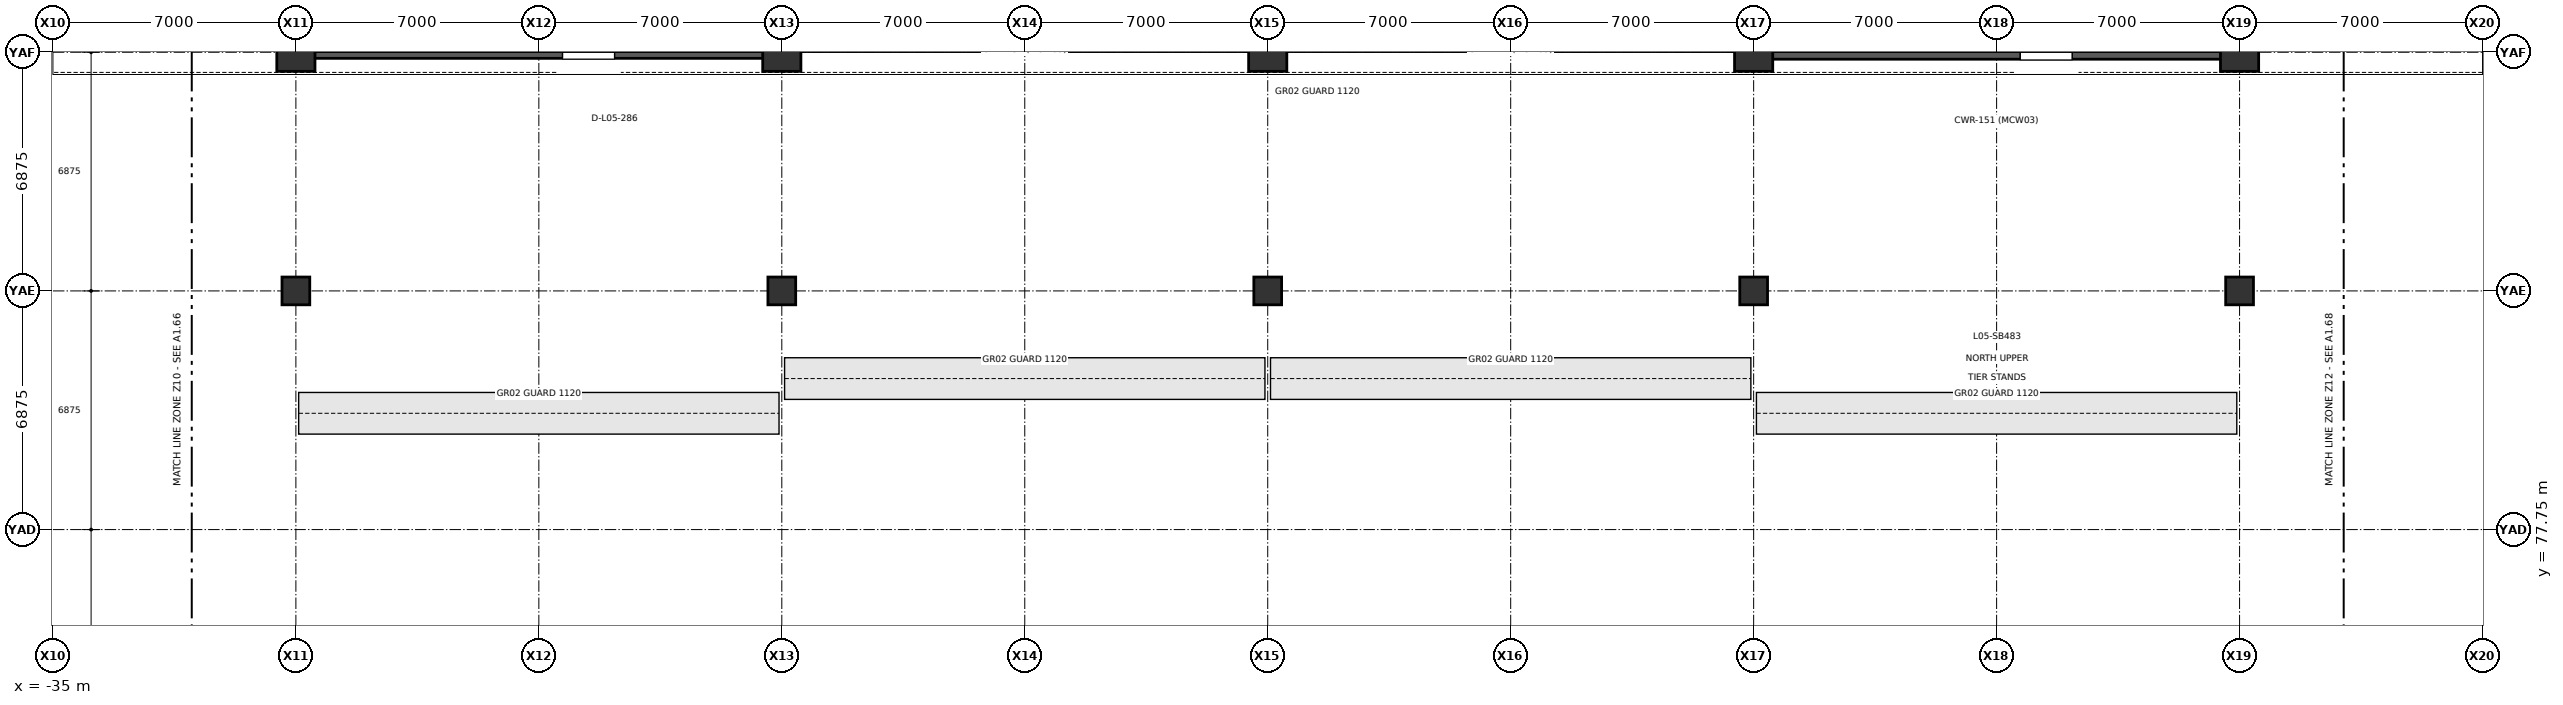
"""IFC4 building model, lengths in metres.
Left out: names, types, materials, properties, quantities, classifications, styles, units other than length and angle.
Written with IfcOpenShell. Run it as: python <this file> out.ifc"""

import sys

from ifc_helpers import new_model, si_unit, direction, frame, frame_2d, origin, origin_2d, place, context, subcontext, project, spatial, rectangle, circle, extrude, element, fill, save


model = new_model("IFC4")
c1 = context("Model", 3, precision=1e-05, world=origin(), true_north=direction((0.0, 1.0)))
c2 = subcontext(c1, "Body", "Model", "MODEL_VIEW")
j1 = project(units=[si_unit("LENGTHUNIT", "METRE"), si_unit("PLANEANGLEUNIT", "RADIAN")], contexts=[c1])
p1 = place(None, origin())
s1 = spatial("IfcSite", under=j1, at=p1, CompositionType="ELEMENT")
p2 = place(p1, origin())
s2 = spatial("IfcBuilding", under=s1, at=p2, CompositionType="ELEMENT")
p3 = place(p2, frame((0.0, 0.0, 21.0)))
s3 = spatial("IfcBuildingStorey", under=s2, at=p3, CompositionType="ELEMENT", Elevation=21.0)
p4 = place(p3, frame((-28.0, 84.625, 0.0), z_axis=(0.0, 0.0, 1.0), x_axis=(1.0, 0.0, 0.0)))
e1 = element("IfcColumn", 1, at=p4, inside=s3, PredefinedType="COLUMN", context=c2, shape_type="SweptSolid", body=[
    extrude(rectangle(XDim=0.8, YDim=0.8, at=origin_2d()), origin(), (0.0, 0.0, 1.0), 5.4),
])
p5 = place(p3, frame((-28.0, 91.5, 0.0), z_axis=(0.0, 0.0, 1.0), x_axis=(1.0, 0.0, 0.0)))
e2 = element("IfcColumn", 2, at=p5, inside=s3, PredefinedType="COLUMN", context=c2, shape_type="SweptSolid", body=[
    extrude(circle(Radius=0.55, at=origin_2d()), origin(), (0.0, 0.0, 1.0), 5.185),
])
p6 = place(p3, frame((-14.0, 84.625, 0.0), z_axis=(0.0, 0.0, 1.0), x_axis=(1.0, 0.0, 0.0)))
e3 = element("IfcColumn", 3, at=p6, inside=s3, PredefinedType="COLUMN", context=c2, shape_type="SweptSolid", body=[
    extrude(rectangle(XDim=0.8, YDim=0.8, at=origin_2d()), origin(), (0.0, 0.0, 1.0), 5.4),
])
p7 = place(p3, frame((-14.0, 91.5, 0.0), z_axis=(0.0, 0.0, 1.0), x_axis=(1.0, 0.0, 0.0)))
e4 = element("IfcColumn", 4, at=p7, inside=s3, PredefinedType="COLUMN", context=c2, shape_type="SweptSolid", body=[
    extrude(circle(Radius=0.55, at=origin_2d()), origin(), (0.0, 0.0, 1.0), 5.185),
])
p8 = place(p3, frame((0.0, 84.625, 0.0), z_axis=(0.0, 0.0, 1.0), x_axis=(1.0, 0.0, 0.0)))
e5 = element("IfcColumn", 5, at=p8, inside=s3, PredefinedType="COLUMN", context=c2, shape_type="SweptSolid", body=[
    extrude(rectangle(XDim=0.8, YDim=0.8, at=origin_2d()), origin(), (0.0, 0.0, 1.0), 5.4),
])
p9 = place(p3, frame((0.0, 91.5, 0.0), z_axis=(0.0, 0.0, 1.0), x_axis=(1.0, 0.0, 0.0)))
e6 = element("IfcColumn", 6, at=p9, inside=s3, PredefinedType="COLUMN", context=c2, shape_type="SweptSolid", body=[
    extrude(circle(Radius=0.55, at=origin_2d()), origin(), (0.0, 0.0, 1.0), 5.185),
])
p10 = place(p3, frame((14.0, 84.625, 0.0), z_axis=(0.0, 0.0, 1.0), x_axis=(1.0, 0.0, 0.0)))
e7 = element("IfcColumn", 7, at=p10, inside=s3, PredefinedType="COLUMN", context=c2, shape_type="SweptSolid", body=[
    extrude(rectangle(XDim=0.8, YDim=0.8, at=origin_2d()), origin(), (0.0, 0.0, 1.0), 5.4),
])
p11 = place(p3, frame((14.0, 91.5, 0.0), z_axis=(0.0, 0.0, 1.0), x_axis=(1.0, 0.0, 0.0)))
e8 = element("IfcColumn", 8, at=p11, inside=s3, PredefinedType="COLUMN", context=c2, shape_type="SweptSolid", body=[
    extrude(circle(Radius=0.55, at=origin_2d()), origin(), (0.0, 0.0, 1.0), 5.185),
])
p12 = place(p3, frame((28.0, 84.625, 0.0), z_axis=(0.0, 0.0, 1.0), x_axis=(1.0, 0.0, 0.0)))
e9 = element("IfcColumn", 9, at=p12, inside=s3, PredefinedType="COLUMN", context=c2, shape_type="SweptSolid", body=[
    extrude(rectangle(XDim=0.8, YDim=0.8, at=origin_2d()), origin(), (0.0, 0.0, 1.0), 5.4),
])
p13 = place(p3, frame((28.0, 91.5, 0.0), z_axis=(0.0, 0.0, 1.0), x_axis=(1.0, 0.0, 0.0)))
e10 = element("IfcColumn", 10, at=p13, inside=s3, PredefinedType="COLUMN", context=c2, shape_type="SweptSolid", body=[
    extrude(circle(Radius=0.55, at=origin_2d()), origin(), (0.0, 0.0, 1.0), 5.185),
])
p14 = place(p3, frame((-27.825, 91.5, 0.0), z_axis=(0.0, 0.0, 1.0), x_axis=(1.0, 0.0, 0.0)))
e11 = element("IfcWall", 11, at=p14, inside=s3, PredefinedType="SHEAR", context=c2, shape_type="SweptSolid", body=[
    extrude(rectangle(XDim=13.65, YDim=0.35, at=frame_2d((6.825, 0.0))), origin(), (0.0, 0.0, 1.0), 5.185),
])
p15 = place(p14, frame((7.507, 0.0, 0.0)))
e12 = element("IfcOpeningElement", 12, at=p15, cuts=e11, PredefinedType="OPENING", context=c2, shape_type="SweptSolid", body=[
    extrude(rectangle(XDim=1.5, YDim=2.2, at=frame_2d((0.75, 1.1))), frame((0.0, 0.185, 0.0), z_axis=(0.0, -1.0, 0.0), x_axis=(1.0, 0.0, 0.0)), (0.0, 0.0, 1.0), 0.37),
])
p16 = place(p3, frame((14.2, 91.5, 0.0), z_axis=(0.0, 0.0, 1.0), x_axis=(1.0, 0.0, 0.0)))
e13 = element("IfcWall", 13, at=p16, inside=s3, PredefinedType="SHEAR", context=c2, shape_type="SweptSolid", body=[
    extrude(rectangle(XDim=13.6, YDim=0.4, at=frame_2d((6.8, 0.0))), origin(), (0.0, 0.0, 1.0), 5.185),
])
p17 = place(p16, frame((7.48, 0.0, 0.0)))
e14 = element("IfcOpeningElement", 14, at=p17, cuts=e13, PredefinedType="OPENING", context=c2, shape_type="SweptSolid", body=[
    extrude(rectangle(XDim=1.5, YDim=2.2, at=frame_2d((0.75, 1.1))), frame((0.0, 0.21, 0.0), z_axis=(0.0, -1.0, 0.0), x_axis=(1.0, 0.0, 0.0)), (0.0, 0.0, 1.0), 0.42),
])
p18 = place(p15, origin())
e15 = element("IfcDoor", 15, at=p18, inside=s3, OperationType="SINGLE_SWING_RIGHT", PredefinedType="DOOR", context=c2, shape_type="SweptSolid", body=[
    extrude(rectangle(XDim=1.5, YDim=2.2, at=frame_2d((0.75, 1.1))), frame((0.0, 0.025, 0.0), z_axis=(0.0, -1.0, 0.0), x_axis=(1.0, 0.0, 0.0)), (0.0, 0.0, 1.0), 0.05),
])
fill(e12, e15)
p19 = place(p17, origin())
e16 = element("IfcDoor", 16, at=p19, inside=s3, OperationType="SINGLE_SWING_RIGHT", PredefinedType="DOOR", context=c2, shape_type="SweptSolid", body=[
    extrude(rectangle(XDim=1.5, YDim=2.2, at=frame_2d((0.75, 1.1))), frame((0.0, 0.025, 0.0), z_axis=(0.0, -1.0, 0.0), x_axis=(1.0, 0.0, 0.0)), (0.0, 0.0, 1.0), 0.05),
])
fill(e14, e16)
save(model, sys.argv[1])
